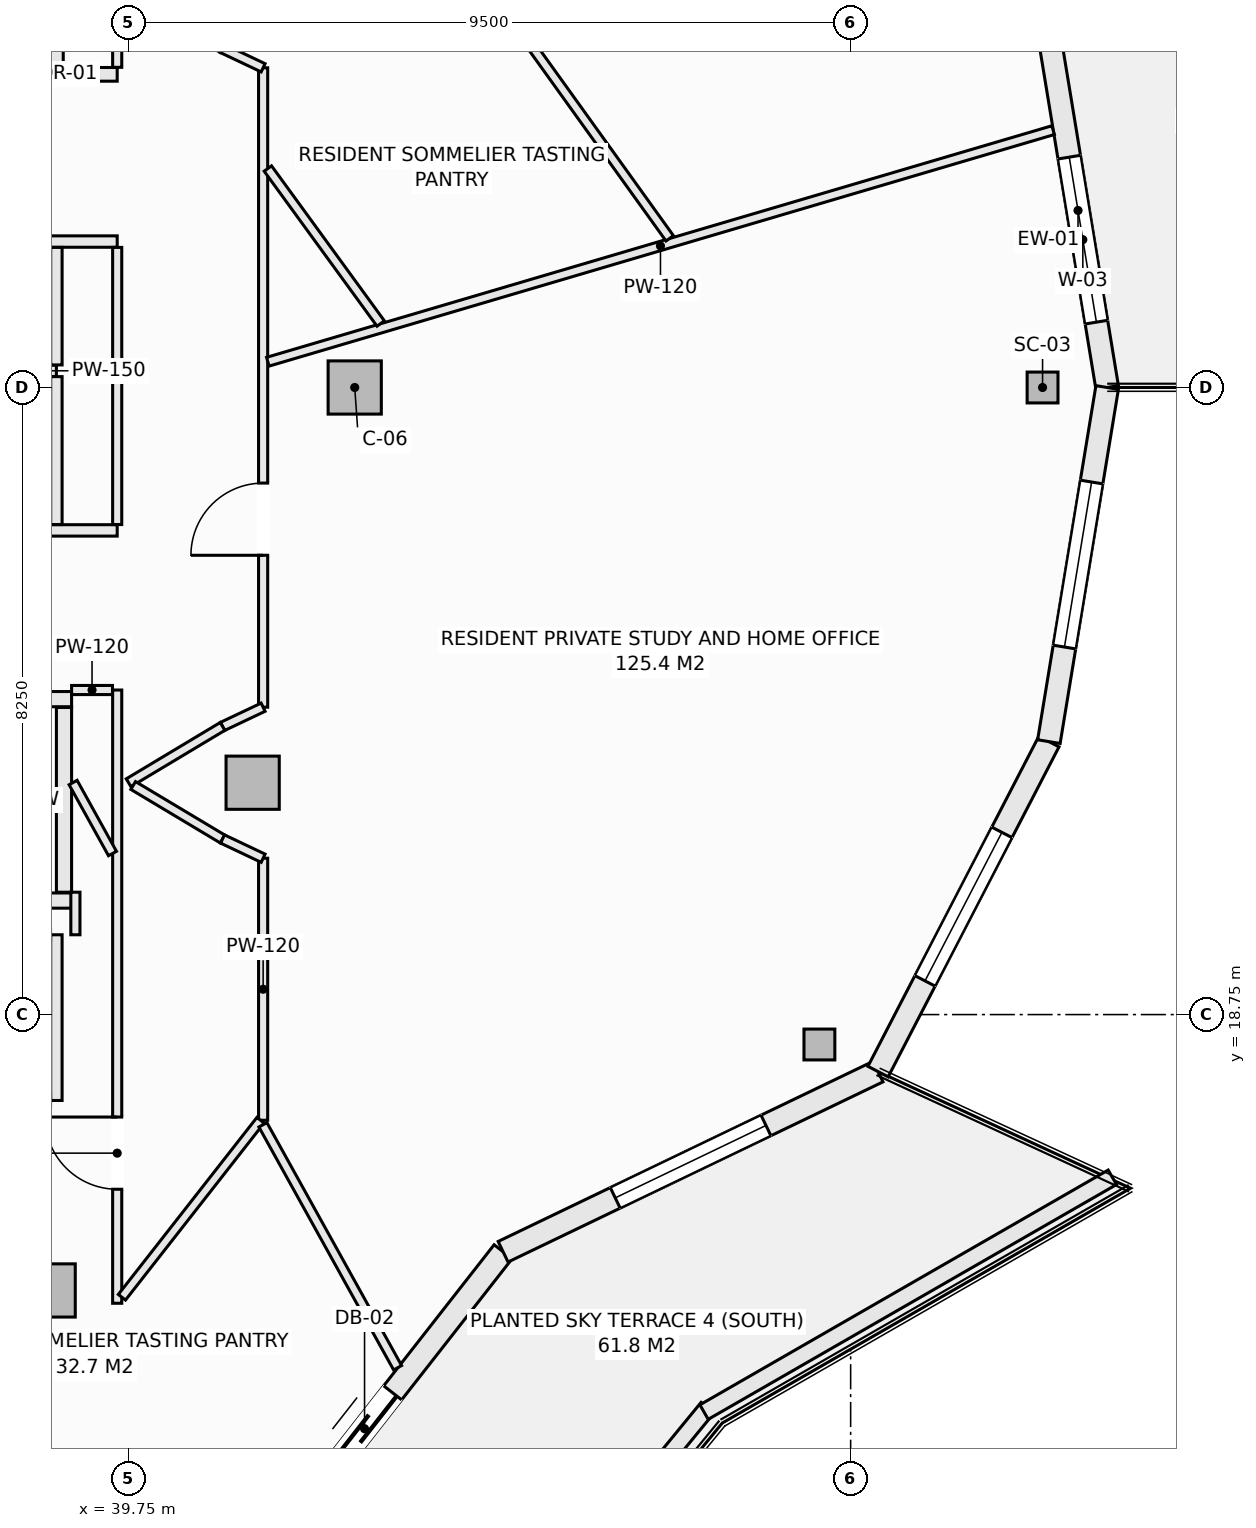
"""IFC4 building model, lengths in metres.
Left out: names, types, materials, properties, quantities, classifications, styles, units other than length and angle.
Written with IfcOpenShell. Run it as: python <this file> out.ifc"""

import sys

from ifc_helpers import new_model, si_unit, direction, frame, frame_2d, origin, origin_2d, place, context, subcontext, project, spatial, rectangle, hollow_rectangle, extrude, element, fill, save


model = new_model("IFC4")
c1 = context("Model", 3, precision=1e-05, world=origin(), true_north=direction((0.0, 1.0)))
c2 = subcontext(c1, "Body", "Model", "MODEL_VIEW")
j1 = project(units=[si_unit("LENGTHUNIT", "METRE"), si_unit("PLANEANGLEUNIT", "RADIAN")], contexts=[c1])
p1 = place(None, origin())
s1 = spatial("IfcSite", under=j1, at=p1, CompositionType="ELEMENT")
p2 = place(p1, origin())
s2 = spatial("IfcBuilding", under=s1, at=p2, CompositionType="ELEMENT")
p3 = place(p2, frame((0.0, 0.0, 242.6)))
s3 = spatial("IfcBuildingStorey", under=s2, at=p3, CompositionType="ELEMENT", Elevation=242.6)
for number, where, z_axis, x_axis in (
    (1, (51.775, 27.0, -0.27), (0.0, 0.0, 1.0), (1.0, 0.0, 0.0)),
    (2, (48.839, 18.356, -0.27), (0.0, 0.0, 1.0), (1.0, 0.0, 0.0)),
):
    element("IfcColumn", number, at=place(p3, frame(where, z_axis=z_axis, x_axis=x_axis)), inside=s3, PredefinedType="COLUMN", context=c2, shape_type="SweptSolid", body=[
        extrude(hollow_rectangle(XDim=0.406, YDim=0.406, WallThickness=0.016, at=origin_2d()), origin(), (0.0, 0.0, 1.0), 3.3),
    ])
for number, where, z_axis, x_axis in (
    (3, (42.725, 27.0, -0.27), (0.0, 0.0, 1.0), (1.0, 0.0, 0.0)),
    (4, (38.698, 15.121, -0.27), (0.0, 0.0, 1.0), (1.0, 0.0, 0.0)),
    (5, (41.382, 21.801, -0.27), (0.0, 0.0, 1.0), (1.0, 0.0, 0.0)),
):
    element("IfcColumn", number, at=place(p3, frame(where, z_axis=z_axis, x_axis=x_axis)), inside=s3, PredefinedType="COLUMN", context=c2, shape_type="SweptSolid", body=[
        extrude(rectangle(XDim=0.7, YDim=0.7, at=origin_2d()), origin(), (0.0, 0.0, 1.0), 3.3),
    ])
p4 = place(p3, frame((51.858, 31.659, 0.0), z_axis=(0.0, 0.0, 1.0), x_axis=(0.162369371657, -0.986730047758, 0.0)))
e6 = element("IfcWall", 6, at=p4, inside=s3, PredefinedType="SOLIDWALL", context=c2, shape_type="SweptSolid", body=[
    extrude(rectangle(XDim=4.721, YDim=0.3, at=frame_2d((2.361, 0.0))), origin(), (0.0, 0.0, 1.0), 2.605),
])
p5 = place(p4, frame((1.65, 0.0, 0.72)))
e7 = element("IfcOpeningElement", 7, at=p5, cuts=e6, PredefinedType="OPENING", context=c2, shape_type="SweptSolid", body=[
    extrude(rectangle(XDim=2.2, YDim=1.65, at=frame_2d((1.1, 0.825))), frame((0.0, 0.16, 0.0), z_axis=(0.0, -1.0, 0.0), x_axis=(1.0, 0.0, 0.0)), (0.0, 0.0, 1.0), 0.32),
])
p6 = place(p3, frame((41.375, 11.412, 0.0), z_axis=(0.0, 0.0, 1.0), x_axis=(0.61644588519, 0.787397276241, 0.0)))
e8 = element("IfcWall", 8, at=p6, inside=s3, PredefinedType="SOLIDWALL", context=c2, shape_type="SweptSolid", body=[
    extrude(rectangle(XDim=5.357, YDim=0.3, at=frame_2d((2.678, 0.0))), origin(), (0.0, 0.0, 1.0), 2.605),
])
p7 = place(p6, frame((1.8, 0.0, 0.0)))
e9 = element("IfcOpeningElement", 9, at=p7, cuts=e8, PredefinedType="OPENING", context=c2, shape_type="SweptSolid", body=[
    extrude(rectangle(XDim=1.2, YDim=2.2, at=frame_2d((0.6, 1.1))), frame((0.0, 0.16, 0.0), z_axis=(0.0, -1.0, 0.0), x_axis=(1.0, 0.0, 0.0)), (0.0, 0.0, 1.0), 0.32),
])
p8 = place(p3, frame((44.677, 15.63, 0.0), z_axis=(0.0, 0.0, 1.0), x_axis=(0.901355238351, 0.433080517106, 0.0)))
e10 = element("IfcWall", 10, at=p8, inside=s3, PredefinedType="SOLIDWALL", context=c2, shape_type="SweptSolid", body=[
    extrude(rectangle(XDim=5.473, YDim=0.3, at=frame_2d((2.737, 0.0))), origin(), (0.0, 0.0, 1.0), 2.605),
])
p9 = place(p8, frame((1.637, 0.0, 0.72)))
e11 = element("IfcOpeningElement", 11, at=p9, cuts=e10, PredefinedType="OPENING", context=c2, shape_type="SweptSolid", body=[
    extrude(rectangle(XDim=2.2, YDim=1.65, at=frame_2d((1.1, 0.825))), frame((0.0, 0.16, 0.0), z_axis=(0.0, -1.0, 0.0), x_axis=(1.0, 0.0, 0.0)), (0.0, 0.0, 1.0), 0.32),
])
p10 = place(p3, frame((49.611, 18.0, 0.0), z_axis=(0.0, 0.0, 1.0), x_axis=(0.459793771602, 0.888025724625, 0.0)))
e12 = element("IfcWall", 12, at=p10, inside=s3, PredefinedType="SOLIDWALL", context=c2, shape_type="SweptSolid", body=[
    extrude(rectangle(XDim=4.889, YDim=0.3, at=frame_2d((2.444, 0.0))), origin(), (0.0, 0.0, 1.0), 2.605),
])
p11 = place(p10, frame((1.344, 0.0, 0.72)))
e13 = element("IfcOpeningElement", 13, at=p11, cuts=e12, PredefinedType="OPENING", context=c2, shape_type="SweptSolid", body=[
    extrude(rectangle(XDim=2.2, YDim=1.65, at=frame_2d((1.1, 0.825))), frame((0.0, 0.16, 0.0), z_axis=(0.0, -1.0, 0.0), x_axis=(1.0, 0.0, 0.0)), (0.0, 0.0, 1.0), 0.32),
])
p12 = place(p3, frame((51.858, 22.341, 0.0), z_axis=(0.0, 0.0, 1.0), x_axis=(0.162369371657, 0.986730047758, 0.0)))
e14 = element("IfcWall", 14, at=p12, inside=s3, PredefinedType="SOLIDWALL", context=c2, shape_type="SweptSolid", body=[
    extrude(rectangle(XDim=4.721, YDim=0.3, at=frame_2d((2.361, 0.0))), origin(), (0.0, 0.0, 1.0), 2.605),
])
p13 = place(p12, frame((1.261, 0.0, 0.72)))
e15 = element("IfcOpeningElement", 15, at=p13, cuts=e14, PredefinedType="OPENING", context=c2, shape_type="SweptSolid", body=[
    extrude(rectangle(XDim=2.2, YDim=1.65, at=frame_2d((1.1, 0.825))), frame((0.0, 0.16, 0.0), z_axis=(0.0, -1.0, 0.0), x_axis=(1.0, 0.0, 0.0)), (0.0, 0.0, 1.0), 0.32),
])
p14 = place(p3, frame((43.323, 8.646, 0.0), z_axis=(0.0, 0.0, 1.0), x_axis=(0.63407318032, 0.77327304492, 0.0)))
e16 = element("IfcWall", 16, at=p14, inside=s3, PredefinedType="PARAPET", context=c2, shape_type="SweptSolid", body=[
    extrude(rectangle(XDim=6.379, YDim=0.22, at=frame_2d((3.189, 0.0))), origin(), (0.0, 0.0, 1.0), 0.52),
])
p15 = place(p3, frame((47.321, 13.521, 0.0), z_axis=(0.0, 0.0, 1.0), x_axis=(0.866901621005, 0.49847926687, 0.0)))
e17 = element("IfcWall", 17, at=p15, inside=s3, PredefinedType="PARAPET", context=c2, shape_type="SweptSolid", body=[
    extrude(rectangle(XDim=6.197, YDim=0.22, at=frame_2d((3.098, 0.0))), origin(), (0.0, 0.0, 1.0), 0.52),
])
p16 = place(p3, frame((36.75, 22.9, 0.0), z_axis=(0.0, 0.0, 1.0), x_axis=(1.0, 0.0, 0.0)))
e18 = element("IfcWall", 18, at=p16, inside=s3, PredefinedType="SOLIDWALL", context=c2, shape_type="SweptSolid", body=[
    extrude(rectangle(XDim=2.25, YDim=0.2, at=frame_2d((1.125, 0.0))), origin(), (0.0, 0.0, 1.0), 3.03),
])
p17 = place(p16, frame((0.575, 0.0, 0.0)))
e19 = element("IfcOpeningElement", 19, at=p17, cuts=e18, PredefinedType="OPENING", context=c2, shape_type="SweptSolid", body=[
    extrude(rectangle(XDim=1.1, YDim=2.2, at=frame_2d((0.55, 1.1))), frame((0.0, 0.11, 0.0), z_axis=(0.0, -1.0, 0.0), x_axis=(1.0, 0.0, 0.0)), (0.0, 0.0, 1.0), 0.22),
])
p18 = place(p3, frame((36.75, 20.25, 0.0), z_axis=(0.0, 0.0, 1.0), x_axis=(1.0, 0.0, 0.0)))
e20 = element("IfcWall", 20, at=p18, inside=s3, PredefinedType="SOLIDWALL", context=c2, shape_type="SweptSolid", body=[
    extrude(rectangle(XDim=2.25, YDim=0.2, at=frame_2d((1.125, 0.0))), origin(), (0.0, 0.0, 1.0), 3.03),
])
p19 = place(p3, frame((38.9, 20.36, 0.0), z_axis=(0.0, 0.0, 1.0), x_axis=(0.0, 1.0, 0.0)))
e21 = element("IfcWall", 21, at=p19, inside=s3, PredefinedType="SOLIDWALL", context=c2, shape_type="SweptSolid", body=[
    extrude(rectangle(XDim=2.43, YDim=0.2, at=frame_2d((1.215, 0.0))), origin(), (0.0, 0.0, 1.0), 3.03),
])
p20 = place(p3, frame((30.077, 28.92, 0.0), z_axis=(0.0, 0.0, 1.0), x_axis=(1.0, 0.0, 0.0)))
e22 = element("IfcWall", 22, at=p20, inside=s3, PredefinedType="PARTITIONING", context=c2, shape_type="SweptSolid", body=[
    extrude(rectangle(XDim=9.523, YDim=0.15, at=frame_2d((4.762, 0.0))), origin(), (0.0, 0.0, 1.0), 3.03),
])
p21 = place(p20, frame((1.342, 0.0, 0.0)))
e23 = element("IfcOpeningElement", 23, at=p21, cuts=e22, PredefinedType="OPENING", context=c2, shape_type="SweptSolid", body=[
    extrude(rectangle(XDim=0.95, YDim=2.1, at=frame_2d((0.475, 1.05))), frame((0.0, 0.085, 0.0), z_axis=(0.0, -1.0, 0.0), x_axis=(1.0, 0.0, 0.0)), (0.0, 0.0, 1.0), 0.17),
])
p22 = place(p20, frame((5.498, 0.0, 0.0)))
e24 = element("IfcOpeningElement", 24, at=p22, cuts=e22, PredefinedType="OPENING", context=c2, shape_type="SweptSolid", body=[
    extrude(rectangle(XDim=0.95, YDim=2.1, at=frame_2d((0.475, 1.05))), frame((0.0, 0.085, 0.0), z_axis=(0.0, -1.0, 0.0), x_axis=(1.0, 0.0, 0.0)), (0.0, 0.0, 1.0), 0.17),
])
p23 = place(p3, frame((33.377, 25.12, 0.0), z_axis=(0.0, 0.0, 1.0), x_axis=(1.0, 0.0, 0.0)))
e25 = element("IfcWall", 25, at=p23, inside=s3, PredefinedType="PARTITIONING", context=c2, shape_type="SweptSolid", body=[
    extrude(rectangle(XDim=6.223, YDim=0.15, at=frame_2d((3.112, 0.0))), origin(), (0.0, 0.0, 1.0), 3.03),
])
p24 = place(p23, frame((2.441, 0.0, 0.0)))
e26 = element("IfcOpeningElement", 26, at=p24, cuts=e25, PredefinedType="OPENING", context=c2, shape_type="SweptSolid", body=[
    extrude(rectangle(XDim=0.95, YDim=2.1, at=frame_2d((0.475, 1.05))), frame((0.0, 0.085, 0.0), z_axis=(0.0, -1.0, 0.0), x_axis=(1.0, 0.0, 0.0)), (0.0, 0.0, 1.0), 0.17),
])
p25 = place(p3, frame((33.377, 27.22, 0.0), z_axis=(0.0, 0.0, 1.0), x_axis=(1.0, 0.0, 0.0)))
e27 = element("IfcWall", 27, at=p25, inside=s3, PredefinedType="PARTITIONING", context=c2, shape_type="SweptSolid", body=[
    extrude(rectangle(XDim=5.423, YDim=0.15, at=frame_2d((2.711, 0.0))), origin(), (0.0, 0.0, 1.0), 3.03),
])
p26 = place(p3, frame((38.8, 17.62, 0.0), z_axis=(0.0, 0.0, 1.0), x_axis=(0.0, 1.0, 0.0)))
e28 = element("IfcWall", 28, at=p26, inside=s3, PredefinedType="PARTITIONING", context=c2, shape_type="SweptSolid", body=[
    extrude(rectangle(XDim=2.18, YDim=0.15, at=frame_2d((1.09, 0.0))), origin(), (0.0, 0.0, 1.0), 3.03),
])
p27 = place(p3, frame((38.8, 25.197, 0.0), z_axis=(0.0, 0.0, 1.0), x_axis=(0.0, 1.0, 0.0)))
e29 = element("IfcWall", 29, at=p27, inside=s3, PredefinedType="PARTITIONING", context=c2, shape_type="SweptSolid", body=[
    extrude(rectangle(XDim=1.946, YDim=0.15, at=frame_2d((0.973, 0.0))), origin(), (0.0, 0.0, 1.0), 3.03),
])
p28 = place(p3, frame((38.8, 27.297, 0.0), z_axis=(0.0, 0.0, 1.0), x_axis=(0.0, 1.0, 0.0)))
e30 = element("IfcWall", 30, at=p28, inside=s3, PredefinedType="PARTITIONING", context=c2, shape_type="SweptSolid", body=[
    extrude(rectangle(XDim=1.546, YDim=0.15, at=frame_2d((0.773, 0.0))), origin(), (0.0, 0.0, 1.0), 3.03),
])
p29 = place(p3, frame((38.8, 31.12, 0.0), z_axis=(0.0, 0.0, 1.0), x_axis=(0.0, 1.0, 0.0)))
e31 = element("IfcWall", 31, at=p29, inside=s3, PredefinedType="SOLIDWALL", context=c2, shape_type="SweptSolid", body=[
    extrude(rectangle(XDim=2.63, YDim=0.18, at=frame_2d((1.315, 0.0))), origin(), (0.0, 0.0, 1.0), 3.03),
])
p30 = place(p3, frame((38.892, 31.12, 0.0), z_axis=(0.0, 0.0, 1.0), x_axis=(1.0, 0.0, 0.0)))
e32 = element("IfcWall", 32, at=p30, inside=s3, PredefinedType="SOLIDWALL", context=c2, shape_type="SweptSolid", body=[
    extrude(rectangle(XDim=0.708, YDim=0.18, at=frame_2d((0.354, 0.0))), origin(), (0.0, 0.0, 1.0), 3.03),
])
p31 = place(p3, frame((39.05, 19.8, 0.0), z_axis=(0.0, 0.0, 1.0), x_axis=(0.0, 1.0, 0.0)))
e33 = element("IfcWall", 33, at=p31, inside=s3, PredefinedType="PARTITIONING", context=c2, shape_type="SweptSolid", body=[
    extrude(rectangle(XDim=0.56, YDim=0.12, at=frame_2d((0.28, 0.0))), origin(), (0.0, 0.0, 1.0), 3.03),
])
p32 = place(p3, frame((39.6, 14.952, 0.0), z_axis=(0.0, 0.0, 1.0), x_axis=(0.0, 1.0, 0.0)))
e34 = element("IfcWall", 34, at=p32, inside=s3, PredefinedType="PARTITIONING", context=c2, shape_type="SweptSolid", body=[
    extrude(rectangle(XDim=8.068, YDim=0.12, at=frame_2d((4.034, 0.0))), origin(), (0.0, 0.0, 1.0), 2.478),
])
p33 = place(p32, frame((1.5, 0.0, 0.0)))
e35 = element("IfcOpeningElement", 35, at=p33, cuts=e34, PredefinedType="OPENING", context=c2, shape_type="SweptSolid", body=[
    extrude(rectangle(XDim=0.95, YDim=2.1, at=frame_2d((0.475, 1.05))), frame((0.0, 0.07, 0.0), z_axis=(0.0, -1.0, 0.0), x_axis=(1.0, 0.0, 0.0)), (0.0, 0.0, 1.0), 0.14),
])
p34 = place(p3, frame((39.6, 25.197, 0.0), z_axis=(0.0, 0.0, 1.0), x_axis=(0.0, 1.0, 0.0)))
e36 = element("IfcWall", 36, at=p34, inside=s3, PredefinedType="PARTITIONING", context=c2, shape_type="SweptSolid", body=[
    extrude(rectangle(XDim=3.646, YDim=0.12, at=frame_2d((1.823, 0.0))), origin(), (0.0, 0.0, 1.0), 3.03),
])
p35 = place(p3, frame((39.6, 31.212, 0.0), z_axis=(0.0, 0.0, 1.0), x_axis=(0.0, 1.0, 0.0)))
e37 = element("IfcWall", 37, at=p35, inside=s3, PredefinedType="PARTITIONING", context=c2, shape_type="SweptSolid", body=[
    extrude(rectangle(XDim=7.871, YDim=0.12, at=frame_2d((3.936, 0.0))), origin(), (0.0, 0.0, 1.0), 3.03),
])
p36 = place(p35, frame((4.706, 0.0, 0.0)))
e38 = element("IfcOpeningElement", 38, at=p36, cuts=e37, PredefinedType="OPENING", context=c2, shape_type="SweptSolid", body=[
    extrude(rectangle(XDim=0.95, YDim=2.1, at=frame_2d((0.475, 1.05))), frame((0.0, 0.07, 0.0), z_axis=(0.0, -1.0, 0.0), x_axis=(1.0, 0.0, 0.0)), (0.0, 0.0, 1.0), 0.14),
])
p37 = place(p3, frame((41.52, 17.36, 0.0), z_axis=(0.0, 0.0, 1.0), x_axis=(0.0, 1.0, 0.0)))
e39 = element("IfcWall", 39, at=p37, inside=s3, PredefinedType="PARTITIONING", context=c2, shape_type="SweptSolid", body=[
    extrude(rectangle(XDim=3.447, YDim=0.12, at=frame_2d((1.723, 0.0))), origin(), (0.0, 0.0, 1.0), 3.03),
])
p38 = place(p3, frame((41.52, 22.794, 0.0), z_axis=(0.0, 0.0, 1.0), x_axis=(0.0, 1.0, 0.0)))
e40 = element("IfcWall", 40, at=p38, inside=s3, PredefinedType="PARTITIONING", context=c2, shape_type="SweptSolid", body=[
    extrude(rectangle(XDim=8.412, YDim=0.12, at=frame_2d((4.206, 0.0))), origin(), (0.0, 0.0, 1.0), 2.478),
])
p39 = place(p38, frame((1.999, 0.0, 0.0)))
e41 = element("IfcOpeningElement", 41, at=p39, cuts=e40, PredefinedType="OPENING", context=c2, shape_type="SweptSolid", body=[
    extrude(rectangle(XDim=0.95, YDim=2.1, at=frame_2d((0.475, 1.05))), frame((0.0, 0.07, 0.0), z_axis=(0.0, -1.0, 0.0), x_axis=(1.0, 0.0, 0.0)), (0.0, 0.0, 1.0), 0.14),
])
for number, where, z_axis, x_axis in (
    (42, (40.986, 31.459, 0.0), (0.0, 0.0, 1.0), (0.904, -0.428, 0.0)),
    (43, (40.986, 22.541, 0.0), (0.0, 0.0, 1.0), (0.904, 0.428, 0.0)),
):
    element("IfcWall", number, at=place(p3, frame(where, z_axis=z_axis, x_axis=x_axis)), inside=s3, PredefinedType="PARTITIONING", context=c2, shape_type="SweptSolid", body=[
        extrude(rectangle(XDim=0.591, YDim=0.12, at=frame_2d((0.295, 0.0))), origin(), (0.0, 0.0, 1.0), 3.03),
    ])
p40 = place(p3, frame((39.75, 21.8, 0.0), z_axis=(0.0, 0.0, 1.0), x_axis=(0.857702120906, 0.514146935996, 0.0)))
e44 = element("IfcWall", 44, at=p40, inside=s3, PredefinedType="PARTITIONING", context=c2, shape_type="SweptSolid", body=[
    extrude(rectangle(XDim=1.441, YDim=0.12, at=frame_2d((0.721, 0.0))), origin(), (0.0, 0.0, 1.0), 3.03),
])
p41 = place(p3, frame((39.81, 21.764, 0.0), z_axis=(0.0, 0.0, 1.0), x_axis=(0.858011245414, -0.513630901273, 0.0)))
e45 = element("IfcWall", 45, at=p41, inside=s3, PredefinedType="PARTITIONING", context=c2, shape_type="SweptSolid", body=[
    extrude(rectangle(XDim=1.37, YDim=0.12, at=frame_2d((0.685, 0.0))), origin(), (0.0, 0.0, 1.0), 3.03),
])
p42 = place(p3, frame((40.986, 21.06, 0.0), z_axis=(0.0, 0.0, 1.0), x_axis=(0.90356951601, -0.428441512621, 0.0)))
e46 = element("IfcWall", 46, at=p42, inside=s3, PredefinedType="PARTITIONING", context=c2, shape_type="SweptSolid", body=[
    extrude(rectangle(XDim=0.591, YDim=0.12, at=frame_2d((0.295, 0.0))), origin(), (0.0, 0.0, 1.0), 3.03),
])
p43 = place(p3, frame((39.662, 15.031, 0.0), z_axis=(0.0, 0.0, 1.0), x_axis=(0.616497420092, 0.787356927334, 0.0)))
e47 = element("IfcWall", 47, at=p43, inside=s3, PredefinedType="PARTITIONING", context=c2, shape_type="SweptSolid", body=[
    extrude(rectangle(XDim=2.958, YDim=0.12, at=frame_2d((1.479, 0.0))), origin(), (0.0, 0.0, 1.0), 3.03),
])
p44 = place(p3, frame((39.0, 23.02, 0.0), z_axis=(0.0, 0.0, 1.0), x_axis=(1.0, 0.0, 0.0)))
e48 = element("IfcWall", 48, at=p44, inside=s3, PredefinedType="PARTITIONING", context=c2, shape_type="SweptSolid", body=[
    extrude(rectangle(XDim=0.538, YDim=0.12, at=frame_2d((0.269, 0.0))), origin(), (0.0, 0.0, 1.0), 3.03),
])
p45 = place(p3, frame((41.582, 27.339, 0.0), z_axis=(0.0, 0.0, 1.0), x_axis=(0.959173635638, 0.282817850741, 0.0)))
e49 = element("IfcWall", 49, at=p45, inside=s3, PredefinedType="PARTITIONING", context=c2, shape_type="SweptSolid", body=[
    extrude(rectangle(XDim=10.771, YDim=0.12, at=frame_2d((5.386, 0.0))), origin(), (0.0, 0.0, 1.0), 3.03),
])
p46 = place(p3, frame((39.02, 21.803, 0.0), z_axis=(0.0, 0.0, 1.0), x_axis=(0.485021793049, -0.874502064187, 0.0)))
e50 = element("IfcWall", 50, at=p46, inside=s3, PredefinedType="PARTITIONING", context=c2, shape_type="SweptSolid", body=[
    extrude(rectangle(XDim=1.068, YDim=0.12, at=frame_2d((0.534, 0.0))), origin(), (0.0, 0.0, 1.0), 3.03),
])
p47 = place(p3, frame((41.517, 17.3, 0.0), z_axis=(0.0, 0.0, 1.0), x_axis=(0.484911097078, -0.874563449917, 0.0)))
e51 = element("IfcWall", 51, at=p47, inside=s3, PredefinedType="PARTITIONING", context=c2, shape_type="SweptSolid", body=[
    extrude(rectangle(XDim=3.655, YDim=0.12, at=frame_2d((1.827, 0.0))), origin(), (0.0, 0.0, 1.0), 2.77),
])
p48 = place(p3, frame((41.582, 29.881, 0.0), z_axis=(0.0, 0.0, 1.0), x_axis=(0.588620460465, -0.808409520925, 0.0)))
e52 = element("IfcWall", 52, at=p48, inside=s3, PredefinedType="PARTITIONING", context=c2, shape_type="SweptSolid", body=[
    extrude(rectangle(XDim=2.523, YDim=0.12, at=frame_2d((1.261, 0.0))), origin(), (0.0, 0.0, 1.0), 2.478),
])
p49 = place(p3, frame((41.582, 36.324, 0.0), z_axis=(0.0, 0.0, 1.0), x_axis=(0.583386800507, -0.812194460086, 0.0)))
e53 = element("IfcWall", 53, at=p49, inside=s3, PredefinedType="PARTITIONING", context=c2, shape_type="SweptSolid", body=[
    extrude(rectangle(XDim=9.063, YDim=0.12, at=frame_2d((4.532, 0.0))), origin(), (0.0, 0.0, 1.0), 3.03),
])
p50 = place(p5, origin())
e54 = element("IfcWindow", 54, at=p50, inside=s3, PartitioningType="SINGLE_PANEL", PredefinedType="WINDOW", context=c2, shape_type="SweptSolid", body=[
    extrude(rectangle(XDim=2.2, YDim=1.65, at=frame_2d((1.1, 0.825))), frame((0.0, 0.03, 0.0), z_axis=(0.0, -1.0, 0.0), x_axis=(1.0, 0.0, 0.0)), (0.0, 0.0, 1.0), 0.06),
])
fill(e7, e54)
p51 = place(p7, frame((1.2, 0.0, 0.0), z_axis=(0.0, 0.0, 1.0), x_axis=(-1.0, 0.0, 0.0)))
e55 = element("IfcDoor", 55, at=p51, inside=s3, OperationType="SLIDING_TO_LEFT", PredefinedType="DOOR", context=c2, shape_type="SweptSolid", body=[
    extrude(rectangle(XDim=1.2, YDim=2.2, at=frame_2d((0.6, 1.1))), frame((0.0, 0.025, 0.0), z_axis=(0.0, -1.0, 0.0), x_axis=(1.0, 0.0, 0.0)), (0.0, 0.0, 1.0), 0.05),
])
fill(e9, e55)
p52 = place(p9, origin())
e56 = element("IfcWindow", 56, at=p52, inside=s3, PartitioningType="SINGLE_PANEL", PredefinedType="WINDOW", context=c2, shape_type="SweptSolid", body=[
    extrude(rectangle(XDim=2.2, YDim=1.65, at=frame_2d((1.1, 0.825))), frame((0.0, 0.03, 0.0), z_axis=(0.0, -1.0, 0.0), x_axis=(1.0, 0.0, 0.0)), (0.0, 0.0, 1.0), 0.06),
])
fill(e11, e56)
p53 = place(p11, origin())
e57 = element("IfcWindow", 57, at=p53, inside=s3, PartitioningType="SINGLE_PANEL", PredefinedType="WINDOW", context=c2, shape_type="SweptSolid", body=[
    extrude(rectangle(XDim=2.2, YDim=1.65, at=frame_2d((1.1, 0.825))), frame((0.0, 0.03, 0.0), z_axis=(0.0, -1.0, 0.0), x_axis=(1.0, 0.0, 0.0)), (0.0, 0.0, 1.0), 0.06),
])
fill(e13, e57)
p54 = place(p13, origin())
e58 = element("IfcWindow", 58, at=p54, inside=s3, PartitioningType="SINGLE_PANEL", PredefinedType="WINDOW", context=c2, shape_type="SweptSolid", body=[
    extrude(rectangle(XDim=2.2, YDim=1.65, at=frame_2d((1.1, 0.825))), frame((0.0, 0.03, 0.0), z_axis=(0.0, -1.0, 0.0), x_axis=(1.0, 0.0, 0.0)), (0.0, 0.0, 1.0), 0.06),
])
fill(e15, e58)
p55 = place(p33, origin())
e59 = element("IfcDoor", 59, at=p55, inside=s3, OperationType="SINGLE_SWING_RIGHT", PredefinedType="DOOR", context=c2, shape_type="SweptSolid", body=[
    extrude(rectangle(XDim=0.95, YDim=2.1, at=frame_2d((0.475, 1.05))), frame((0.0, 0.025, 0.0), z_axis=(0.0, -1.0, 0.0), x_axis=(1.0, 0.0, 0.0)), (0.0, 0.0, 1.0), 0.05),
])
fill(e35, e59)
p56 = place(p39, origin())
e60 = element("IfcDoor", 60, at=p56, inside=s3, OperationType="SINGLE_SWING_LEFT", PredefinedType="DOOR", context=c2, shape_type="SweptSolid", body=[
    extrude(rectangle(XDim=0.95, YDim=2.1, at=frame_2d((0.475, 1.05))), frame((0.0, 0.025, 0.0), z_axis=(0.0, -1.0, 0.0), x_axis=(1.0, 0.0, 0.0)), (0.0, 0.0, 1.0), 0.05),
])
fill(e41, e60)
save(model, sys.argv[1])
